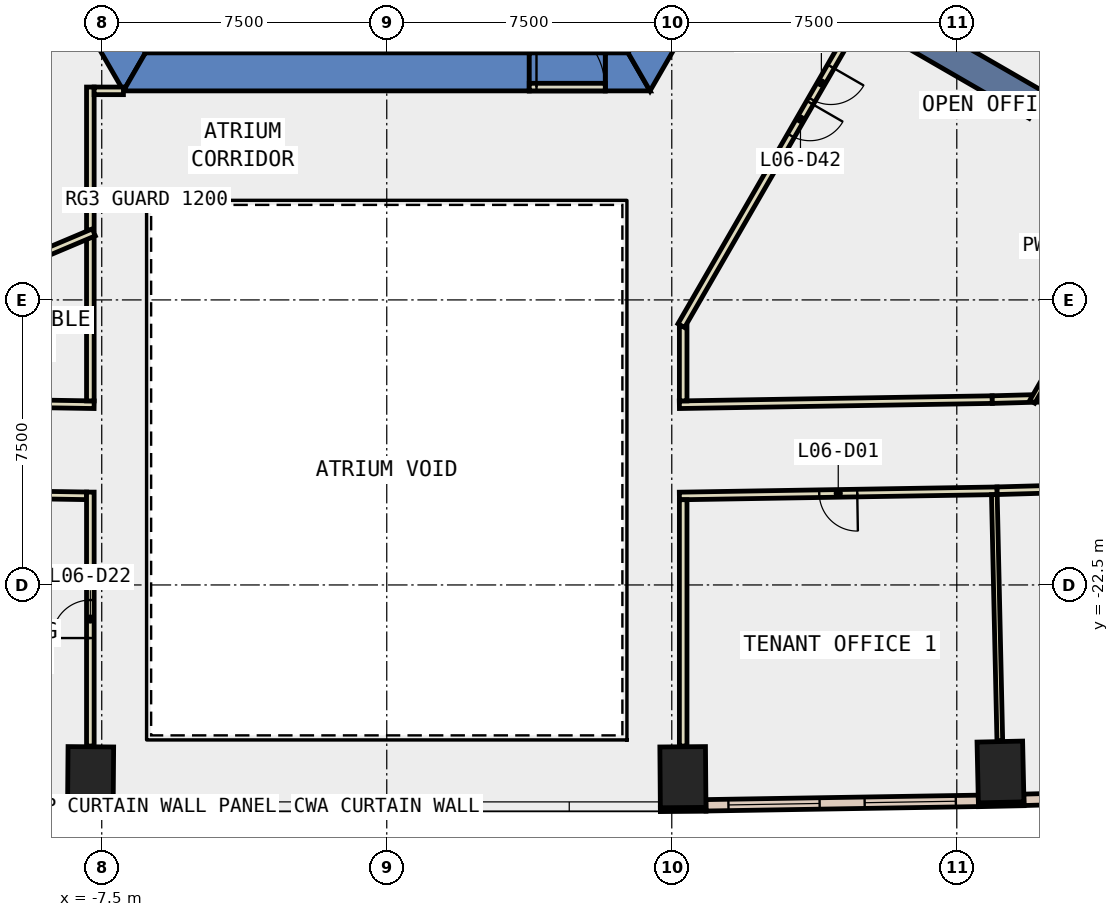
"""IFC4 building model, lengths in metres.
Left out: names, types, materials, properties, quantities, classifications, styles, units other than length and angle.
Written with IfcOpenShell. Run it as: python <this file> out.ifc"""

import sys

from ifc_helpers import new_model, si_unit, direction, frame, frame_2d, origin, origin_2d, place, context, subcontext, project, spatial, polyline, rectangle, outline, extrude, element, fill, save


model = new_model("IFC4")
c1 = context("Model", 3, precision=1e-05, world=origin(), true_north=direction((0.0, 1.0)))
c2 = subcontext(c1, "Body", "Model", "MODEL_VIEW")
j1 = project(units=[si_unit("LENGTHUNIT", "METRE"), si_unit("PLANEANGLEUNIT", "RADIAN")], contexts=[c1])
p1 = place(None, origin())
s1 = spatial("IfcSite", under=j1, at=p1, CompositionType="ELEMENT")
p2 = place(p1, origin())
s2 = spatial("IfcBuilding", under=s1, at=p2, CompositionType="ELEMENT")
p3 = place(p2, frame((0.0, 0.0, 35.0)))
s3 = spatial("IfcBuildingStorey", under=s2, at=p3, CompositionType="ELEMENT", Elevation=35.0)
for number, where, z_axis, x_axis in (
    (1, (-7.793, -27.558, -0.6), (0.0, 0.0, 1.0), (-1.0, 0.008, 0.0)),
    (2, (7.793, -27.558, -0.6), (0.0, 0.0, 1.0), (1.0, 0.008, 0.0)),
    (3, (16.15, -27.421, -0.6), (0.0, 0.0, 1.0), (1.0, 0.022, 0.0)),
):
    element("IfcColumn", number, at=place(p3, frame(where, z_axis=z_axis, x_axis=x_axis)), inside=s3, PredefinedType="COLUMN", context=c2, shape_type="SweptSolid", body=[
        extrude(rectangle(XDim=1.2, YDim=1.6, at=origin_2d()), origin(), (0.0, 0.0, 1.0), 4.4),
    ])
p4 = place(p3, frame((0.0, 0.0, -0.6)))
e4 = element("IfcWall", 4, at=p4, inside=s3, PredefinedType="SHEAR", context=c2, shape_type="SweptSolid", body=[
    extrude(outline(polyline([(-13.856, 2.5), (-6.928, -9.5), (-6.351, -8.5), (-12.702, 2.5), (-13.856, 2.5)])), origin(), (0.0, 0.0, 1.0), 4.4),
])
p5 = place(p3, frame((0.0, 0.0, -0.6)))
e5 = element("IfcWall", 5, at=p5, inside=s3, PredefinedType="SHEAR", context=c2, shape_type="SweptSolid", body=[
    extrude(outline(polyline([(3.75, -9.5), (3.75, -8.5), (-6.351, -8.5), (-6.928, -9.5), (3.75, -9.5)])), origin(), (0.0, 0.0, 1.0), 4.4),
])
p6 = place(p3, frame((0.0, 0.0, -0.6)))
e6 = element("IfcWall", 6, at=p6, inside=s3, PredefinedType="SHEAR", context=c2, shape_type="SweptSolid", body=[
    extrude(outline(polyline([(5.75, -8.5), (5.75, -9.5), (6.928, -9.5), (6.351, -8.5), (5.75, -8.5)])), origin(), (0.0, 0.0, 1.0), 4.4),
])
p7 = place(p3, frame((0.0, 0.0, 3.6)))
e7 = element("IfcWall", 7, at=p7, inside=s3, PredefinedType="SHEAR", context=c2, shape_type="SweptSolid", body=[
    extrude(outline(polyline([(5.75, -9.5), (5.75, -8.5), (3.75, -8.5), (3.75, -9.5), (5.75, -9.5)])), origin(), (0.0, 0.0, 1.0), 0.2),
])
p8 = place(p3, frame((0.0, 0.0, -0.6)))
e8 = element("IfcWall", 8, at=p8, inside=s3, PredefinedType="SHEAR", context=c2, shape_type="SweptSolid", body=[
    extrude(outline(polyline([(8.117, -7.44), (7.252, -6.94), (6.351, -8.5), (6.928, -9.5), (8.117, -7.44)])), origin(), (0.0, 0.0, 1.0), 4.4),
])
p9 = place(p3, frame((9.31, -5.375, -0.6), z_axis=(0.0, 0.0, 1.0), x_axis=(0.866017533419, -0.500013631625, 0.0)))
e9 = element("IfcWall", 9, at=p9, inside=s3, PredefinedType="SHEAR", context=c2, shape_type="SweptSolid", body=[
    extrude(rectangle(XDim=9.0, YDim=0.8, at=frame_2d((4.5, 0.0))), origin(), (0.0, 0.0, 1.0), 4.4),
])
for number, where, z_axis, x_axis in (
    (10, (-8.4, -28.403, 0.0), (0.0, 0.0, 1.0), (1.0, -0.008, 0.0)),
    (11, (7.2, -28.413, 0.0), (0.0, 0.0, 1.0), (1.0, 0.008, 0.0)),
):
    element("IfcWall", number, at=place(p3, frame(where, z_axis=z_axis, x_axis=x_axis)), inside=s3, PredefinedType="STANDARD", context=c2, shape_type="SweptSolid", body=[
        extrude(rectangle(XDim=1.2, YDim=0.1, at=frame_2d((0.6, 0.0))), origin(), (0.0, 0.0, 1.0), 3.8),
    ])
p10 = place(p3, frame((15.569, -28.284, 0.0), z_axis=(0.0, 0.0, 1.0), x_axis=(0.99976752127, 0.021561618973, 0.0)))
e12 = element("IfcWall", 12, at=p10, inside=s3, PredefinedType="STANDARD", context=c2, shape_type="SweptSolid", body=[
    extrude(rectangle(XDim=1.2, YDim=0.1, at=frame_2d((0.6, 0.0))), origin(), (0.0, 0.0, 1.0), 3.8),
])
p11 = place(p3, frame((-15.568, -28.181, 0.0), z_axis=(0.0, 0.0, 1.0), x_axis=(0.999866467443, -0.016341581408, 0.0)))
e13 = element("IfcWall", 13, at=p11, inside=s3, PredefinedType="STANDARD", context=c2, shape_type="SweptSolid", body=[
    extrude(rectangle(XDim=7.171, YDim=0.3, at=frame_2d((3.585, 0.0))), origin(), (0.0, 0.0, 1.0), 3.8),
])
p12 = place(p11, frame((0.593, 0.0, 0.9)))
e14 = element("IfcOpeningElement", 14, at=p12, cuts=e13, PredefinedType="OPENING", context=c2, shape_type="SweptSolid", body=[
    extrude(rectangle(XDim=2.4, YDim=2.6, at=frame_2d((1.2, 1.3))), frame((0.0, 0.16, 0.0), z_axis=(0.0, -1.0, 0.0), x_axis=(1.0, 0.0, 0.0)), (0.0, 0.0, 1.0), 0.32),
])
p13 = place(p11, frame((4.178, 0.0, 0.9)))
e15 = element("IfcOpeningElement", 15, at=p13, cuts=e13, PredefinedType="OPENING", context=c2, shape_type="SweptSolid", body=[
    extrude(rectangle(XDim=2.4, YDim=2.6, at=frame_2d((1.2, 1.3))), frame((0.0, 0.16, 0.0), z_axis=(0.0, -1.0, 0.0), x_axis=(1.0, 0.0, 0.0)), (0.0, 0.0, 1.0), 0.32),
])
p14 = place(p3, frame((8.398, -28.298, 0.0), z_axis=(0.0, 0.0, 1.0), x_axis=(0.999866467443, 0.016341581408, 0.0)))
e16 = element("IfcWall", 16, at=p14, inside=s3, PredefinedType="STANDARD", context=c2, shape_type="SweptSolid", body=[
    extrude(rectangle(XDim=7.171, YDim=0.3, at=frame_2d((3.585, 0.0))), origin(), (0.0, 0.0, 1.0), 3.8),
])
p15 = place(p14, frame((0.593, 0.0, 0.9)))
e17 = element("IfcOpeningElement", 17, at=p15, cuts=e16, PredefinedType="OPENING", context=c2, shape_type="SweptSolid", body=[
    extrude(rectangle(XDim=2.4, YDim=2.6, at=frame_2d((1.2, 1.3))), frame((0.0, 0.16, 0.0), z_axis=(0.0, -1.0, 0.0), x_axis=(1.0, 0.0, 0.0)), (0.0, 0.0, 1.0), 0.32),
])
p16 = place(p14, frame((4.178, 0.0, 0.9)))
e18 = element("IfcOpeningElement", 18, at=p16, cuts=e16, PredefinedType="OPENING", context=c2, shape_type="SweptSolid", body=[
    extrude(rectangle(XDim=2.4, YDim=2.6, at=frame_2d((1.2, 1.3))), frame((0.0, 0.16, 0.0), z_axis=(0.0, -1.0, 0.0), x_axis=(1.0, 0.0, 0.0)), (0.0, 0.0, 1.0), 0.32),
])
p17 = place(p3, frame((16.765, -28.154, 0.0), z_axis=(0.0, 0.0, 1.0), x_axis=(0.999611502654, 0.02787191709, 0.0)))
e19 = element("IfcWall", 19, at=p17, inside=s3, PredefinedType="STANDARD", context=c2, shape_type="SweptSolid", body=[
    extrude(rectangle(XDim=7.174, YDim=0.3, at=frame_2d((3.587, 0.0))), origin(), (0.0, 0.0, 1.0), 3.8),
])
p18 = place(p17, frame((0.593, 0.0, 0.9)))
e20 = element("IfcOpeningElement", 20, at=p18, cuts=e19, PredefinedType="OPENING", context=c2, shape_type="SweptSolid", body=[
    extrude(rectangle(XDim=2.4, YDim=2.6, at=frame_2d((1.2, 1.3))), frame((0.0, 0.16, 0.0), z_axis=(0.0, -1.0, 0.0), x_axis=(1.0, 0.0, 0.0)), (0.0, 0.0, 1.0), 0.32),
])
p19 = place(p17, frame((4.18, 0.0, 0.9)))
e21 = element("IfcOpeningElement", 21, at=p19, cuts=e19, PredefinedType="OPENING", context=c2, shape_type="SweptSolid", body=[
    extrude(rectangle(XDim=2.4, YDim=2.6, at=frame_2d((1.2, 1.3))), frame((0.0, 0.16, 0.0), z_axis=(0.0, -1.0, 0.0), x_axis=(1.0, 0.0, 0.0)), (0.0, 0.0, 1.0), 0.32),
])
p20 = place(p3, frame((7.7, -17.758, 0.0), z_axis=(0.0, 0.0, 1.0), x_axis=(0.999865574926, 0.016396099485, 0.0)))
e22 = element("IfcWall", 22, at=p20, inside=s3, PredefinedType="PARTITIONING", context=c2, shape_type="SweptSolid", body=[
    extrude(rectangle(XDim=8.234, YDim=0.2, at=frame_2d((4.117, 0.0))), origin(), (0.0, 0.0, 1.0), 3.8),
])
p21 = place(p3, frame((15.933, -17.623, 0.0), z_axis=(0.0, 0.0, 1.0), x_axis=(0.999627129061, 0.027305729179, 0.0)))
e23 = element("IfcWall", 23, at=p21, inside=s3, PredefinedType="PARTITIONING", context=c2, shape_type="SweptSolid", body=[
    extrude(rectangle(XDim=1.028, YDim=0.2, at=frame_2d((0.514, 0.0))), origin(), (0.0, 0.0, 1.0), 3.8),
])
p22 = place(p3, frame((17.111, -17.591, 0.0), z_axis=(0.0, 0.0, 1.0), x_axis=(0.99960470841, 0.028114532261, 0.0)))
e24 = element("IfcWall", 24, at=p22, inside=s3, PredefinedType="PARTITIONING", context=c2, shape_type="SweptSolid", body=[
    extrude(rectangle(XDim=5.87, YDim=0.2, at=frame_2d((2.935, 0.0))), origin(), (0.0, 0.0, 1.0), 3.8),
])
p23 = place(p22, frame((2.435, 0.0, 0.0)))
e25 = element("IfcOpeningElement", 25, at=p23, cuts=e24, PredefinedType="OPENING", context=c2, shape_type="SweptSolid", body=[
    extrude(rectangle(XDim=1.0, YDim=2.1, at=frame_2d((0.5, 1.05))), frame((0.0, 0.11, 0.0), z_axis=(0.0, -1.0, 0.0), x_axis=(1.0, 0.0, 0.0)), (0.0, 0.0, 1.0), 0.22),
])
p24 = place(p3, frame((-15.73, -17.627, 0.0), z_axis=(0.0, 0.0, 1.0), x_axis=(0.999866746812, -0.016324479129, 0.0)))
e26 = element("IfcWall", 26, at=p24, inside=s3, PredefinedType="PARTITIONING", context=c2, shape_type="SweptSolid", body=[
    extrude(rectangle(XDim=8.031, YDim=0.2, at=frame_2d((4.016, 0.0))), origin(), (0.0, 0.0, 1.0), 3.8),
])
p25 = place(p24, frame((3.515, 0.0, 0.0)))
e27 = element("IfcOpeningElement", 27, at=p25, cuts=e26, PredefinedType="OPENING", context=c2, shape_type="SweptSolid", body=[
    extrude(rectangle(XDim=1.0, YDim=2.1, at=frame_2d((0.5, 1.05))), frame((0.0, 0.11, 0.0), z_axis=(0.0, -1.0, 0.0), x_axis=(1.0, 0.0, 0.0)), (0.0, 0.0, 1.0), 0.22),
])
p26 = place(p3, frame((16.061, -20.022, 0.0), z_axis=(0.0, 0.0, 1.0), x_axis=(-0.999865858466, -0.016378799504, 0.0)))
e28 = element("IfcWall", 28, at=p26, inside=s3, PredefinedType="PARTITIONING", context=c2, shape_type="SweptSolid", body=[
    extrude(rectangle(XDim=8.362, YDim=0.2, at=frame_2d((4.181, 0.0))), origin(), (0.0, 0.0, 1.0), 3.8),
])
p27 = place(p26, frame((3.681, 0.0, 0.0)))
e29 = element("IfcOpeningElement", 29, at=p27, cuts=e28, PredefinedType="OPENING", context=c2, shape_type="SweptSolid", body=[
    extrude(rectangle(XDim=1.0, YDim=2.1, at=frame_2d((0.5, 1.05))), frame((0.0, 0.11, 0.0), z_axis=(0.0, -1.0, 0.0), x_axis=(1.0, 0.0, 0.0)), (0.0, 0.0, 1.0), 0.22),
])
p28 = place(p3, frame((24.261, -19.792, 0.0), z_axis=(0.0, 0.0, 1.0), x_axis=(-0.999610256124, -0.027916587377, 0.0)))
e30 = element("IfcWall", 30, at=p28, inside=s3, PredefinedType="PARTITIONING", context=c2, shape_type="SweptSolid", body=[
    extrude(rectangle(XDim=8.203, YDim=0.2, at=frame_2d((4.102, 0.0))), origin(), (0.0, 0.0, 1.0), 3.8),
])
p29 = place(p28, frame((3.677, 0.0, 0.0)))
e31 = element("IfcOpeningElement", 31, at=p29, cuts=e30, PredefinedType="OPENING", context=c2, shape_type="SweptSolid", body=[
    extrude(rectangle(XDim=1.0, YDim=2.1, at=frame_2d((0.5, 1.05))), frame((0.0, 0.11, 0.0), z_axis=(0.0, -1.0, 0.0), x_axis=(1.0, 0.0, 0.0)), (0.0, 0.0, 1.0), 0.22),
])
p30 = place(p3, frame((-7.9, -20.155, 0.0), z_axis=(0.0, 0.0, 1.0), x_axis=(-0.999867846419, 0.016256989184, 0.0)))
e32 = element("IfcWall", 32, at=p30, inside=s3, PredefinedType="PARTITIONING", context=c2, shape_type="SweptSolid", body=[
    extrude(rectangle(XDim=3.875, YDim=0.2, at=frame_2d((1.937, 0.0))), origin(), (0.0, 0.0, 1.0), 3.8),
])
p31 = place(p3, frame((7.8, -15.69, 0.0), z_axis=(0.0, 0.0, 1.0), x_axis=(0.0, -1.0, 0.0)))
e33 = element("IfcWall", 33, at=p31, inside=s3, PredefinedType="PARTITIONING", context=c2, shape_type="SweptSolid", body=[
    extrude(rectangle(XDim=1.967, YDim=0.2, at=frame_2d((0.983, 0.0))), origin(), (0.0, 0.0, 1.0), 3.8),
])
p32 = place(p3, frame((-7.8, -13.161, 0.0), z_axis=(0.0, 0.0, 1.0), x_axis=(0.0, 1.0, 0.0)))
e34 = element("IfcWall", 34, at=p32, inside=s3, PredefinedType="PARTITIONING", context=c2, shape_type="SweptSolid", body=[
    extrude(rectangle(XDim=3.762, YDim=0.2, at=frame_2d((1.881, 0.0))), origin(), (0.0, 0.0, 1.0), 3.8),
])
p33 = place(p3, frame((-7.7, -9.499, 0.0), z_axis=(0.0, 0.0, 1.0), x_axis=(1.0, 0.0, 0.0)))
e35 = element("IfcWall", 35, at=p33, inside=s3, PredefinedType="PARTITIONING", context=c2, shape_type="SweptSolid", body=[
    extrude(rectangle(XDim=0.771, YDim=0.2, at=frame_2d((0.385, 0.0))), origin(), (0.0, 0.0, 1.0), 3.8),
])
p34 = place(p3, frame((-7.8, -17.657, 0.0), z_axis=(0.0, 0.0, 1.0), x_axis=(0.0, 1.0, 0.0)))
e36 = element("IfcWall", 36, at=p34, inside=s3, PredefinedType="PARTITIONING", context=c2, shape_type="SweptSolid", body=[
    extrude(rectangle(XDim=4.296, YDim=0.2, at=frame_2d((2.148, 0.0))), origin(), (0.0, 0.0, 1.0), 3.8),
])
p35 = place(p3, frame((7.8, -20.257, 0.0), z_axis=(0.0, 0.0, 1.0), x_axis=(0.0, -1.0, 0.0)))
e37 = element("IfcWall", 37, at=p35, inside=s3, PredefinedType="PARTITIONING", context=c2, shape_type="SweptSolid", body=[
    extrude(rectangle(XDim=6.481, YDim=0.2, at=frame_2d((3.24, 0.0))), origin(), (0.0, 0.0, 1.0), 3.8),
])
p36 = place(p3, frame((-7.8, -26.738, 0.0), z_axis=(0.0, 0.0, 1.0), x_axis=(0.0, 1.0, 0.0)))
e38 = element("IfcWall", 38, at=p36, inside=s3, PredefinedType="PARTITIONING", context=c2, shape_type="SweptSolid", body=[
    extrude(rectangle(XDim=6.681, YDim=0.2, at=frame_2d((3.341, 0.0))), origin(), (0.0, 0.0, 1.0), 3.8),
])
p37 = place(p36, frame((2.841, 0.0, 0.0)))
e39 = element("IfcOpeningElement", 39, at=p37, cuts=e38, PredefinedType="OPENING", context=c2, shape_type="SweptSolid", body=[
    extrude(rectangle(XDim=1.0, YDim=2.1, at=frame_2d((0.5, 1.05))), frame((0.0, 0.11, 0.0), z_axis=(0.0, -1.0, 0.0), x_axis=(1.0, 0.0, 0.0)), (0.0, 0.0, 1.0), 0.22),
])
p38 = place(p3, frame((20.445, -11.688, 0.0), z_axis=(0.0, 0.0, 1.0), x_axis=(-0.500010633597, -0.866019264387, 0.0)))
e40 = element("IfcWall", 40, at=p38, inside=s3, PredefinedType="PARTITIONING", context=c2, shape_type="SweptSolid", body=[
    extrude(rectangle(XDim=6.918, YDim=0.15, at=frame_2d((3.459, 0.0))), origin(), (0.0, 0.0, 1.0), 3.8),
])
p39 = place(p3, frame((-7.708, -13.222, 0.0), z_axis=(0.0, 0.0, 1.0), x_axis=(-0.921093468555, -0.389341523839, 0.0)))
e41 = element("IfcWall", 41, at=p39, inside=s3, PredefinedType="PARTITIONING", context=c2, shape_type="SweptSolid", body=[
    extrude(rectangle(XDim=9.233, YDim=0.2, at=frame_2d((4.617, 0.0))), origin(), (0.0, 0.0, 1.0), 3.8),
])
p40 = place(p3, frame((15.988, -20.123, 0.0), z_axis=(0.0, 0.0, 1.0), x_axis=(0.022230127358, -0.999752880185, 0.0)))
e42 = element("IfcWall", 42, at=p40, inside=s3, PredefinedType="PARTITIONING", context=c2, shape_type="SweptSolid", body=[
    extrude(rectangle(XDim=6.48, YDim=0.15, at=frame_2d((3.24, 0.0))), origin(), (0.0, 0.0, 1.0), 3.8),
])
p41 = place(p3, frame((3.75, -9.4, 0.0), z_axis=(0.0, 0.0, 1.0), x_axis=(1.0, 0.0, 0.0)))
e43 = element("IfcWall", 43, at=p41, inside=s3, PredefinedType="PARTITIONING", context=c2, shape_type="SweptSolid", body=[
    extrude(rectangle(XDim=2.0, YDim=0.2, at=frame_2d((1.0, 0.0))), origin(), (0.0, 0.0, 1.0), 2.4),
])
p42 = place(p41, frame((0.19, 0.0, 0.0)))
e44 = element("IfcOpeningElement", 44, at=p42, cuts=e43, PredefinedType="OPENING", context=c2, shape_type="SweptSolid", body=[
    extrude(rectangle(XDim=1.8, YDim=2.1, at=frame_2d((0.9, 1.05))), frame((0.0, 0.11, 0.0), z_axis=(0.0, -1.0, 0.0), x_axis=(1.0, 0.0, 0.0)), (0.0, 0.0, 1.0), 0.22),
])
p43 = place(p3, frame((12.401, -7.621, 0.0), z_axis=(0.0, 0.0, 1.0), x_axis=(-0.499983724212, -0.866034800411, 0.0)))
e45 = element("IfcWall", 45, at=p43, inside=s3, PredefinedType="PARTITIONING", context=c2, shape_type="SweptSolid", body=[
    extrude(rectangle(XDim=9.302, YDim=0.2, at=frame_2d((4.651, 0.0))), origin(), (0.0, 0.0, 1.0), 3.8),
])
p44 = place(p43, frame((1.429, 0.0, 0.0)))
e46 = element("IfcOpeningElement", 46, at=p44, cuts=e45, PredefinedType="OPENING", context=c2, shape_type="SweptSolid", body=[
    extrude(rectangle(XDim=1.0, YDim=2.1, at=frame_2d((0.5, 1.05))), frame((0.0, 0.11, 0.0), z_axis=(0.0, -1.0, 0.0), x_axis=(1.0, 0.0, 0.0)), (0.0, 0.0, 1.0), 0.22),
])
p45 = place(p43, frame((2.529, 0.0, 0.0)))
e47 = element("IfcOpeningElement", 47, at=p45, cuts=e45, PredefinedType="OPENING", context=c2, shape_type="SweptSolid", body=[
    extrude(rectangle(XDim=1.0, YDim=2.1, at=frame_2d((0.5, 1.05))), frame((0.0, 0.11, 0.0), z_axis=(0.0, -1.0, 0.0), x_axis=(1.0, 0.0, 0.0)), (0.0, 0.0, 1.0), 0.22),
])
p46 = place(p15, origin())
e48 = element("IfcWindow", 48, at=p46, inside=s3, PartitioningType="SINGLE_PANEL", PredefinedType="WINDOW", context=c2, shape_type="SweptSolid", body=[
    extrude(rectangle(XDim=2.4, YDim=2.6, at=frame_2d((1.2, 1.3))), frame((0.0, 0.03, 0.0), z_axis=(0.0, -1.0, 0.0), x_axis=(1.0, 0.0, 0.0)), (0.0, 0.0, 1.0), 0.06),
])
fill(e17, e48)
p47 = place(p16, origin())
e49 = element("IfcWindow", 49, at=p47, inside=s3, PartitioningType="SINGLE_PANEL", PredefinedType="WINDOW", context=c2, shape_type="SweptSolid", body=[
    extrude(rectangle(XDim=2.4, YDim=2.6, at=frame_2d((1.2, 1.3))), frame((0.0, 0.03, 0.0), z_axis=(0.0, -1.0, 0.0), x_axis=(1.0, 0.0, 0.0)), (0.0, 0.0, 1.0), 0.06),
])
fill(e18, e49)
p48 = place(p27, origin())
e50 = element("IfcDoor", 50, at=p48, inside=s3, OperationType="SINGLE_SWING_RIGHT", PredefinedType="DOOR", context=c2, shape_type="SweptSolid", body=[
    extrude(rectangle(XDim=1.0, YDim=2.1, at=frame_2d((0.5, 1.05))), frame((0.0, 0.025, 0.0), z_axis=(0.0, -1.0, 0.0), x_axis=(1.0, 0.0, 0.0)), (0.0, 0.0, 1.0), 0.05),
])
fill(e29, e50)
p49 = place(p37, origin())
e51 = element("IfcDoor", 51, at=p49, inside=s3, OperationType="SINGLE_SWING_LEFT", PredefinedType="DOOR", context=c2, shape_type="SweptSolid", body=[
    extrude(rectangle(XDim=1.0, YDim=2.1, at=frame_2d((0.5, 1.05))), frame((0.0, 0.025, 0.0), z_axis=(0.0, -1.0, 0.0), x_axis=(1.0, 0.0, 0.0)), (0.0, 0.0, 1.0), 0.05),
])
fill(e39, e51)
p50 = place(p44, origin())
e52 = element("IfcDoor", 52, at=p50, inside=s3, OperationType="SINGLE_SWING_LEFT", PredefinedType="DOOR", context=c2, shape_type="SweptSolid", body=[
    extrude(rectangle(XDim=1.0, YDim=2.1, at=frame_2d((0.5, 1.05))), frame((0.0, 0.025, 0.0), z_axis=(0.0, -1.0, 0.0), x_axis=(1.0, 0.0, 0.0)), (0.0, 0.0, 1.0), 0.05),
])
fill(e46, e52)
p51 = place(p45, origin())
e53 = element("IfcDoor", 53, at=p51, inside=s3, OperationType="SINGLE_SWING_RIGHT", PredefinedType="DOOR", context=c2, shape_type="SweptSolid", body=[
    extrude(rectangle(XDim=1.0, YDim=2.1, at=frame_2d((0.5, 1.05))), frame((0.0, 0.025, 0.0), z_axis=(0.0, -1.0, 0.0), x_axis=(1.0, 0.0, 0.0)), (0.0, 0.0, 1.0), 0.05),
])
fill(e47, e53)
p52 = place(p42, origin())
e54 = element("IfcDoor", 54, at=p52, inside=s3, OperationType="DOUBLE_DOOR_SINGLE_SWING", PredefinedType="DOOR", context=c2, shape_type="SweptSolid", body=[
    extrude(rectangle(XDim=1.8, YDim=2.1, at=frame_2d((0.9, 1.05))), frame((0.0, 0.025, 0.0), z_axis=(0.0, -1.0, 0.0), x_axis=(1.0, 0.0, 0.0)), (0.0, 0.0, 1.0), 0.05),
])
fill(e44, e54)
save(model, sys.argv[1])
